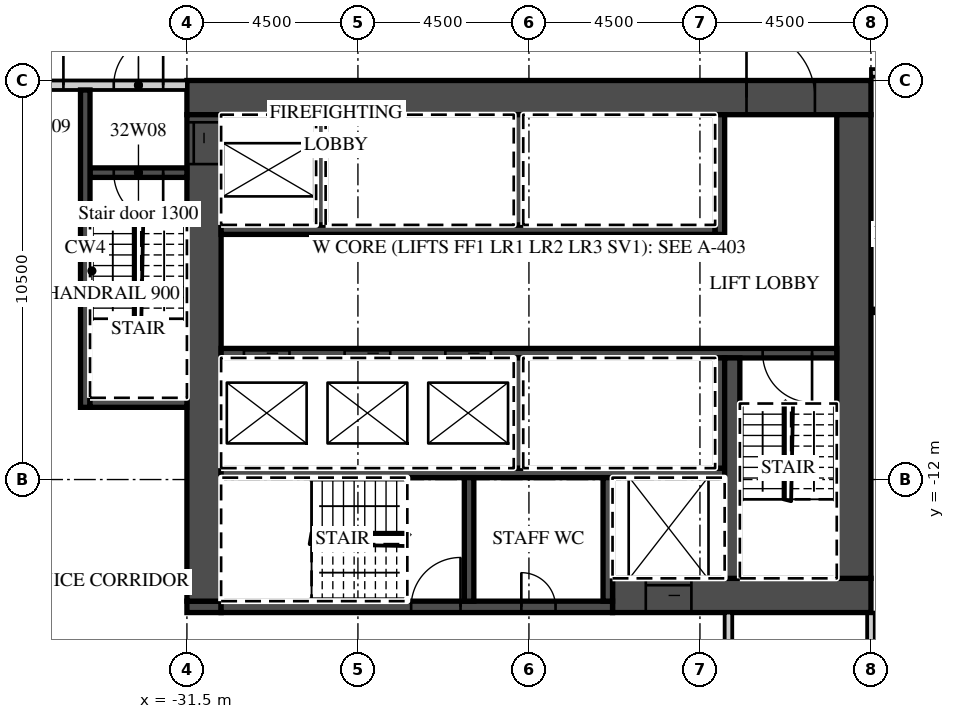
"""IFC4 building model, lengths in metres.
Left out: names, types, materials, properties, quantities, classifications, styles, units other than length and angle.
Written with IfcOpenShell. Run it as: python <this file> out.ifc"""

import sys

from ifc_helpers import new_model, si_unit, direction, frame, frame_2d, origin, place, context, subcontext, project, spatial, rectangle, extrude, element, fill, save


model = new_model("IFC4")
c1 = context("Model", 3, precision=1e-05, world=origin(), true_north=direction((0.0, 1.0)))
c2 = subcontext(c1, "Body", "Model", "MODEL_VIEW")
j1 = project(units=[si_unit("LENGTHUNIT", "METRE"), si_unit("PLANEANGLEUNIT", "RADIAN")], contexts=[c1])
p1 = place(None, origin())
s1 = spatial("IfcSite", under=j1, at=p1, CompositionType="ELEMENT")
p2 = place(p1, origin())
s2 = spatial("IfcBuilding", under=s1, at=p2, CompositionType="ELEMENT")
p3 = place(p2, frame((0.0, 0.0, 140.5)))
s3 = spatial("IfcBuildingStorey", under=s2, at=p3, CompositionType="ELEMENT", Elevation=140.5)
p4 = place(p3, frame((-13.5, -22.232, 0.0), z_axis=(0.0, 0.0, 1.0), x_axis=(0.0, 1.0, 0.0)))
e1 = element("IfcWall", 1, at=p4, inside=s3, PredefinedType="PARTITIONING", context=c2, shape_type="SweptSolid", body=[
    extrude(rectangle(XDim=6.732, YDim=0.2, at=frame_2d((3.366, 0.0))), origin(), (0.0, 0.0, 1.0), 3.02),
])
p5 = place(p3, frame((-13.5, -1.3, 0.0), z_axis=(0.0, 0.0, 1.0), x_axis=(1.0, 0.0, 0.0)))
e2 = element("IfcWall", 2, at=p5, inside=s3, PredefinedType="PARTITIONING", context=c2, shape_type="SweptSolid", body=[
    extrude(rectangle(XDim=60.932, YDim=0.2, at=frame_2d((30.466, 0.0))), origin(), (0.0, 0.0, 1.0), 3.02),
])
p6 = place(p5, frame((2.925, 0.0, 0.0)))
e3 = element("IfcOpeningElement", 3, at=p6, cuts=e2, PredefinedType="OPENING", context=c2, shape_type="SweptSolid", body=[
    extrude(rectangle(XDim=1.0, YDim=2.1, at=frame_2d((0.5, 1.05))), frame((0.0, 0.11, 0.0), z_axis=(0.0, -1.0, 0.0), x_axis=(1.0, 0.0, 0.0)), (0.0, 0.0, 1.0), 0.22),
])
p7 = place(p5, frame((7.45, 0.0, 0.0)))
e4 = element("IfcOpeningElement", 4, at=p7, cuts=e2, PredefinedType="OPENING", context=c2, shape_type="SweptSolid", body=[
    extrude(rectangle(XDim=1.0, YDim=2.1, at=frame_2d((0.5, 1.05))), frame((0.0, 0.11, 0.0), z_axis=(0.0, -1.0, 0.0), x_axis=(1.0, 0.0, 0.0)), (0.0, 0.0, 1.0), 0.22),
])
p8 = place(p5, frame((9.55, 0.0, 0.0)))
e5 = element("IfcOpeningElement", 5, at=p8, cuts=e2, PredefinedType="OPENING", context=c2, shape_type="SweptSolid", body=[
    extrude(rectangle(XDim=1.0, YDim=2.1, at=frame_2d((0.5, 1.05))), frame((0.0, 0.11, 0.0), z_axis=(0.0, -1.0, 0.0), x_axis=(1.0, 0.0, 0.0)), (0.0, 0.0, 1.0), 0.22),
])
p9 = place(p5, frame((15.938, 0.0, 0.0)))
e6 = element("IfcOpeningElement", 6, at=p9, cuts=e2, PredefinedType="OPENING", context=c2, shape_type="SweptSolid", body=[
    extrude(rectangle(XDim=1.2, YDim=2.1, at=frame_2d((0.6, 1.05))), frame((0.0, 0.11, 0.0), z_axis=(0.0, -1.0, 0.0), x_axis=(1.0, 0.0, 0.0)), (0.0, 0.0, 1.0), 0.22),
])
p10 = place(p5, frame((24.938, 0.0, 0.0)))
e7 = element("IfcOpeningElement", 7, at=p10, cuts=e2, PredefinedType="OPENING", context=c2, shape_type="SweptSolid", body=[
    extrude(rectangle(XDim=1.2, YDim=2.1, at=frame_2d((0.6, 1.05))), frame((0.0, 0.11, 0.0), z_axis=(0.0, -1.0, 0.0), x_axis=(1.0, 0.0, 0.0)), (0.0, 0.0, 1.0), 0.22),
])
p11 = place(p5, frame((32.075, 0.0, 0.0)))
e8 = element("IfcOpeningElement", 8, at=p11, cuts=e2, PredefinedType="OPENING", context=c2, shape_type="SweptSolid", body=[
    extrude(rectangle(XDim=1.0, YDim=2.1, at=frame_2d((0.5, 1.05))), frame((0.0, 0.11, 0.0), z_axis=(0.0, -1.0, 0.0), x_axis=(1.0, 0.0, 0.0)), (0.0, 0.0, 1.0), 0.22),
])
p12 = place(p5, frame((36.55, 0.0, 0.0)))
e9 = element("IfcOpeningElement", 9, at=p12, cuts=e2, PredefinedType="OPENING", context=c2, shape_type="SweptSolid", body=[
    extrude(rectangle(XDim=1.0, YDim=2.1, at=frame_2d((0.5, 1.05))), frame((0.0, 0.11, 0.0), z_axis=(0.0, -1.0, 0.0), x_axis=(1.0, 0.0, 0.0)), (0.0, 0.0, 1.0), 0.22),
])
p13 = place(p5, frame((45.862, 0.0, 0.0)))
e10 = element("IfcOpeningElement", 10, at=p13, cuts=e2, PredefinedType="OPENING", context=c2, shape_type="SweptSolid", body=[
    extrude(rectangle(XDim=1.2, YDim=2.1, at=frame_2d((0.6, 1.05))), frame((0.0, 0.11, 0.0), z_axis=(0.0, -1.0, 0.0), x_axis=(1.0, 0.0, 0.0)), (0.0, 0.0, 1.0), 0.22),
])
p14 = place(p5, frame((50.075, 0.0, 0.0)))
e11 = element("IfcOpeningElement", 11, at=p14, cuts=e2, PredefinedType="OPENING", context=c2, shape_type="SweptSolid", body=[
    extrude(rectangle(XDim=1.0, YDim=2.1, at=frame_2d((0.5, 1.05))), frame((0.0, 0.11, 0.0), z_axis=(0.0, -1.0, 0.0), x_axis=(1.0, 0.0, 0.0)), (0.0, 0.0, 1.0), 0.22),
])
p15 = place(p5, frame((56.95, 0.0, 0.0)))
e12 = element("IfcOpeningElement", 12, at=p15, cuts=e2, PredefinedType="OPENING", context=c2, shape_type="SweptSolid", body=[
    extrude(rectangle(XDim=1.0, YDim=2.1, at=frame_2d((0.5, 1.05))), frame((0.0, 0.11, 0.0), z_axis=(0.0, -1.0, 0.0), x_axis=(1.0, 0.0, 0.0)), (0.0, 0.0, 1.0), 0.22),
])
p16 = place(p5, frame((59.882, 0.0, 0.0)))
e13 = element("IfcOpeningElement", 13, at=p16, cuts=e2, PredefinedType="OPENING", context=c2, shape_type="SweptSolid", body=[
    extrude(rectangle(XDim=0.9, YDim=2.1, at=frame_2d((0.45, 1.05))), frame((0.0, 0.11, 0.0), z_axis=(0.0, -1.0, 0.0), x_axis=(1.0, 0.0, 0.0)), (0.0, 0.0, 1.0), 0.22),
])
p17 = place(p3, frame((-31.5, -1.95, 0.0), z_axis=(0.0, 0.0, 1.0), x_axis=(1.0, 0.0, 0.0)))
e14 = element("IfcWall", 14, at=p17, inside=s3, PredefinedType="SHEAR", context=c2, shape_type="SweptSolid", body=[
    extrude(rectangle(XDim=18.0, YDim=0.9, at=frame_2d((9.0, 0.0))), origin(), (0.0, 0.0, 1.0), 3.02),
])
p18 = place(p17, frame((14.725, 0.0, 0.0)))
e15 = element("IfcOpeningElement", 15, at=p18, cuts=e14, PredefinedType="OPENING", context=c2, shape_type="SweptSolid", body=[
    extrude(rectangle(XDim=1.8, YDim=2.1, at=frame_2d((0.9, 1.05))), frame((0.0, 0.46, 0.0), z_axis=(0.0, -1.0, 0.0), x_axis=(1.0, 0.0, 0.0)), (0.0, 0.0, 1.0), 0.92),
])
p19 = place(p3, frame((-20.3, -15.05, 0.0), z_axis=(0.0, 0.0, 1.0), x_axis=(1.0, 0.0, 0.0)))
e16 = element("IfcWall", 16, at=p19, inside=s3, PredefinedType="SHEAR", context=c2, shape_type="SweptSolid", body=[
    extrude(rectangle(XDim=6.8, YDim=0.9, at=frame_2d((3.4, 0.0))), origin(), (0.0, 0.0, 1.0), 3.02),
])
p20 = place(p19, frame((0.875, 0.0, 0.0)))
e17 = element("IfcOpeningElement", 17, at=p20, cuts=e16, PredefinedType="OPENING", context=c2, shape_type="SweptSolid", body=[
    extrude(rectangle(XDim=1.2, YDim=2.1, at=frame_2d((0.6, 1.05))), frame((0.0, 0.46, 0.0), z_axis=(0.0, -1.0, 0.0), x_axis=(1.0, 0.0, 0.0)), (0.0, 0.0, 1.0), 0.92),
])
p21 = place(p3, frame((-31.5, -15.35, 0.0), z_axis=(0.0, 0.0, 1.0), x_axis=(1.0, 0.0, 0.0)))
e18 = element("IfcWall", 18, at=p21, inside=s3, PredefinedType="SHEAR", context=c2, shape_type="SweptSolid", body=[
    extrude(rectangle(XDim=0.9, YDim=0.3, at=frame_2d((0.45, 0.0))), origin(), (0.0, 0.0, 1.0), 3.02),
])
p22 = place(p3, frame((-30.6, -15.35, 0.0), z_axis=(0.0, 0.0, 1.0), x_axis=(1.0, 0.0, 0.0)))
e19 = element("IfcWall", 19, at=p22, inside=s3, PredefinedType="SHEAR", context=c2, shape_type="SweptSolid", body=[
    extrude(rectangle(XDim=10.3, YDim=0.3, at=frame_2d((5.15, 0.0))), origin(), (0.0, 0.0, 1.0), 3.02),
])
p23 = place(p22, frame((5.0, 0.0, 0.0)))
e20 = element("IfcOpeningElement", 20, at=p23, cuts=e19, PredefinedType="OPENING", context=c2, shape_type="SweptSolid", body=[
    extrude(rectangle(XDim=1.3, YDim=2.1, at=frame_2d((0.65, 1.05))), frame((0.0, 0.16, 0.0), z_axis=(0.0, -1.0, 0.0), x_axis=(1.0, 0.0, 0.0)), (0.0, 0.0, 1.0), 0.32),
])
p24 = place(p22, frame((7.9, 0.0, 0.0)))
e21 = element("IfcOpeningElement", 21, at=p24, cuts=e19, PredefinedType="OPENING", context=c2, shape_type="SweptSolid", body=[
    extrude(rectangle(XDim=0.9, YDim=2.1, at=frame_2d((0.45, 1.05))), frame((0.0, 0.16, 0.0), z_axis=(0.0, -1.0, 0.0), x_axis=(1.0, 0.0, 0.0)), (0.0, 0.0, 1.0), 0.32),
])
p25 = place(p3, frame((-31.05, -15.2, 0.0), z_axis=(0.0, 0.0, 1.0), x_axis=(0.0, 1.0, 0.0)))
e22 = element("IfcWall", 22, at=p25, inside=s3, PredefinedType="SHEAR", context=c2, shape_type="SweptSolid", body=[
    extrude(rectangle(XDim=12.8, YDim=0.9, at=frame_2d((6.4, 0.0))), origin(), (0.0, 0.0, 1.0), 3.02),
])
p26 = place(p25, frame((11.5, 0.0, 0.0)))
e23 = element("IfcOpeningElement", 23, at=p26, cuts=e22, PredefinedType="OPENING", context=c2, shape_type="SweptSolid", body=[
    extrude(rectangle(XDim=1.1, YDim=2.1, at=frame_2d((0.55, 1.05))), frame((0.0, 0.46, 0.0), z_axis=(0.0, -1.0, 0.0), x_axis=(1.0, 0.0, 0.0)), (0.0, 0.0, 1.0), 0.92),
])
p27 = place(p3, frame((-13.95, -14.6, 0.0), z_axis=(0.0, 0.0, 1.0), x_axis=(0.0, 1.0, 0.0)))
e24 = element("IfcWall", 24, at=p27, inside=s3, PredefinedType="SHEAR", context=c2, shape_type="SweptSolid", body=[
    extrude(rectangle(XDim=12.2, YDim=0.9, at=frame_2d((6.1, 0.0))), origin(), (0.0, 0.0, 1.0), 3.02),
])
p28 = place(p3, frame((-30.6, -5.425, 0.0), z_axis=(0.0, 0.0, 1.0), x_axis=(1.0, 0.0, 0.0)))
e25 = element("IfcWall", 25, at=p28, inside=s3, PredefinedType="SHEAR", context=c2, shape_type="SweptSolid", body=[
    extrude(rectangle(XDim=13.0, YDim=0.25, at=frame_2d((6.5, 0.0))), origin(), (0.0, 0.0, 1.0), 3.02),
])
p29 = place(p3, frame((-17.475, -5.55, 0.0), z_axis=(0.0, 0.0, 1.0), x_axis=(0.0, 1.0, 0.0)))
e26 = element("IfcWall", 26, at=p29, inside=s3, PredefinedType="SHEAR", context=c2, shape_type="SweptSolid", body=[
    extrude(rectangle(XDim=3.15, YDim=0.25, at=frame_2d((1.575, 0.0))), origin(), (0.0, 0.0, 1.0), 3.02),
])
for number, where, z_axis, x_axis in (
    (27, (-27.975, -5.3, 0.0), (0.0, 0.0, 1.0), (0.0, 1.0, 0.0)),
    (28, (-22.775, -5.3, 0.0), (0.0, 0.0, 1.0), (0.0, 1.0, 0.0)),
):
    element("IfcWall", number, at=place(p3, frame(where, z_axis=z_axis, x_axis=x_axis)), inside=s3, PredefinedType="SHEAR", context=c2, shape_type="SweptSolid", body=[
        extrude(rectangle(XDim=2.9, YDim=0.25, at=frame_2d((1.45, 0.0))), origin(), (0.0, 0.0, 1.0), 3.02),
    ])
p30 = place(p3, frame((-30.6, -8.675, 0.0), z_axis=(0.0, 0.0, 1.0), x_axis=(1.0, 0.0, 0.0)))
e29 = element("IfcWall", 29, at=p30, inside=s3, PredefinedType="SHEAR", context=c2, shape_type="SweptSolid", body=[
    extrude(rectangle(XDim=16.2, YDim=0.25, at=frame_2d((8.1, 0.0))), origin(), (0.0, 0.0, 1.0), 3.02),
])
p31 = place(p30, frame((0.6, 0.0, 0.0)))
e30 = element("IfcOpeningElement", 30, at=p31, cuts=e29, PredefinedType="OPENING", context=c2, shape_type="SweptSolid", body=[
    extrude(rectangle(XDim=1.2, YDim=2.1, at=frame_2d((0.6, 1.05))), frame((0.0, 0.135, 0.0), z_axis=(0.0, -1.0, 0.0), x_axis=(1.0, 0.0, 0.0)), (0.0, 0.0, 1.0), 0.27),
])
p32 = place(p30, frame((3.25, 0.0, 0.0)))
e31 = element("IfcOpeningElement", 31, at=p32, cuts=e29, PredefinedType="OPENING", context=c2, shape_type="SweptSolid", body=[
    extrude(rectangle(XDim=1.2, YDim=2.1, at=frame_2d((0.6, 1.05))), frame((0.0, 0.135, 0.0), z_axis=(0.0, -1.0, 0.0), x_axis=(1.0, 0.0, 0.0)), (0.0, 0.0, 1.0), 0.27),
])
p33 = place(p30, frame((5.9, 0.0, 0.0)))
e32 = element("IfcOpeningElement", 32, at=p33, cuts=e29, PredefinedType="OPENING", context=c2, shape_type="SweptSolid", body=[
    extrude(rectangle(XDim=1.2, YDim=2.1, at=frame_2d((0.6, 1.05))), frame((0.0, 0.135, 0.0), z_axis=(0.0, -1.0, 0.0), x_axis=(1.0, 0.0, 0.0)), (0.0, 0.0, 1.0), 0.27),
])
p34 = place(p30, frame((14.25, 0.0, 0.0)))
e33 = element("IfcOpeningElement", 33, at=p34, cuts=e29, PredefinedType="OPENING", context=c2, shape_type="SweptSolid", body=[
    extrude(rectangle(XDim=1.3, YDim=2.1, at=frame_2d((0.65, 1.05))), frame((0.0, 0.135, 0.0), z_axis=(0.0, -1.0, 0.0), x_axis=(1.0, 0.0, 0.0)), (0.0, 0.0, 1.0), 0.27),
])
p35 = place(p3, frame((-30.6, -11.825, 0.0), z_axis=(0.0, 0.0, 1.0), x_axis=(1.0, 0.0, 0.0)))
e34 = element("IfcWall", 34, at=p35, inside=s3, PredefinedType="SHEAR", context=c2, shape_type="SweptSolid", body=[
    extrude(rectangle(XDim=13.25, YDim=0.25, at=frame_2d((6.625, 0.0))), origin(), (0.0, 0.0, 1.0), 3.02),
])
for number, where, z_axis, x_axis in (
    (35, (-17.475, -11.7, 0.0), (0.0, 0.0, 1.0), (0.0, 1.0, 0.0)),
    (36, (-22.775, -11.7, 0.0), (0.0, 0.0, 1.0), (0.0, 1.0, 0.0)),
):
    element("IfcWall", number, at=place(p3, frame(where, z_axis=z_axis, x_axis=x_axis)), inside=s3, PredefinedType="SHEAR", context=c2, shape_type="SweptSolid", body=[
        extrude(rectangle(XDim=2.9, YDim=0.25, at=frame_2d((1.45, 0.0))), origin(), (0.0, 0.0, 1.0), 3.02),
    ])
p36 = place(p3, frame((-17.15, -14.6, 0.0), z_axis=(0.0, 0.0, 1.0), x_axis=(0.0, 1.0, 0.0)))
e37 = element("IfcWall", 37, at=p36, inside=s3, PredefinedType="SHEAR", context=c2, shape_type="SweptSolid", body=[
    extrude(rectangle(XDim=5.8, YDim=0.4, at=frame_2d((2.9, 0.0))), origin(), (0.0, 0.0, 1.0), 3.02),
])
for number, where, z_axis, x_axis in (
    (38, (-20.425, -15.2, 0.0), (0.0, 0.0, 1.0), (0.0, 1.0, 0.0)),
    (39, (-24.075, -15.2, 0.0), (0.0, 0.0, 1.0), (0.0, 1.0, 0.0)),
):
    element("IfcWall", number, at=place(p3, frame(where, z_axis=z_axis, x_axis=x_axis)), inside=s3, PredefinedType="SHEAR", context=c2, shape_type="SweptSolid", body=[
        extrude(rectangle(XDim=3.25, YDim=0.25, at=frame_2d((1.625, 0.0))), origin(), (0.0, 0.0, 1.0), 3.02),
    ])
p37 = place(p3, frame((-39.035, -1.625, 0.0), z_axis=(0.0, 0.0, 1.0), x_axis=(1.0, 0.0, 0.0)))
e40 = element("IfcWall", 40, at=p37, inside=s3, PredefinedType="PARTITIONING", context=c2, shape_type="SweptSolid", body=[
    extrude(rectangle(XDim=7.535, YDim=0.25, at=frame_2d((3.768, 0.0))), origin(), (0.0, 0.0, 1.0), 3.02),
])
p38 = place(p37, frame((5.61, 0.0, 0.0)))
e41 = element("IfcOpeningElement", 41, at=p38, cuts=e40, PredefinedType="OPENING", context=c2, shape_type="SweptSolid", body=[
    extrude(rectangle(XDim=1.3, YDim=2.1, at=frame_2d((0.65, 1.05))), frame((0.0, 0.135, 0.0), z_axis=(0.0, -1.0, 0.0), x_axis=(1.0, 0.0, 0.0)), (0.0, 0.0, 1.0), 0.27),
])
p39 = place(p37, frame((3.185, 0.0, 0.0)))
e42 = element("IfcOpeningElement", 42, at=p39, cuts=e40, PredefinedType="OPENING", context=c2, shape_type="SweptSolid", body=[
    extrude(rectangle(XDim=1.1, YDim=2.1, at=frame_2d((0.55, 1.05))), frame((0.0, 0.135, 0.0), z_axis=(0.0, -1.0, 0.0), x_axis=(1.0, 0.0, 0.0)), (0.0, 0.0, 1.0), 0.27),
])
p40 = place(p3, frame((-34.05, -3.925, 0.0), z_axis=(0.0, 0.0, 1.0), x_axis=(1.0, 0.0, 0.0)))
e43 = element("IfcWall", 43, at=p40, inside=s3, PredefinedType="SHEAR", context=c2, shape_type="SweptSolid", body=[
    extrude(rectangle(XDim=2.55, YDim=0.25, at=frame_2d((1.275, 0.0))), origin(), (0.0, 0.0, 1.0), 3.02),
])
p41 = place(p40, frame((0.625, 0.0, 0.0)))
e44 = element("IfcOpeningElement", 44, at=p41, cuts=e43, PredefinedType="OPENING", context=c2, shape_type="SweptSolid", body=[
    extrude(rectangle(XDim=1.3, YDim=2.1, at=frame_2d((0.65, 1.05))), frame((0.0, 0.135, 0.0), z_axis=(0.0, -1.0, 0.0), x_axis=(1.0, 0.0, 0.0)), (0.0, 0.0, 1.0), 0.27),
])
p42 = place(p3, frame((-34.175, -10.1, 0.0), z_axis=(0.0, 0.0, 1.0), x_axis=(0.0, 1.0, 0.0)))
e45 = element("IfcWall", 45, at=p42, inside=s3, PredefinedType="SHEAR", context=c2, shape_type="SweptSolid", body=[
    extrude(rectangle(XDim=8.35, YDim=0.25, at=frame_2d((4.175, 0.0))), origin(), (0.0, 0.0, 1.0), 3.02),
])
p43 = place(p3, frame((-34.05, -9.975, 0.0), z_axis=(0.0, 0.0, 1.0), x_axis=(1.0, 0.0, 0.0)))
e46 = element("IfcWall", 46, at=p43, inside=s3, PredefinedType="SHEAR", context=c2, shape_type="SweptSolid", body=[
    extrude(rectangle(XDim=2.55, YDim=0.25, at=frame_2d((1.275, 0.0))), origin(), (0.0, 0.0, 1.0), 3.02),
])
p44 = place(p3, frame((-17.25, -17.7, 0.0), z_axis=(0.0, 0.0, 1.0), x_axis=(0.0, 1.0, 0.0)))
e47 = element("IfcWall", 47, at=p44, inside=s3, PredefinedType="PARTITIONING", context=c2, shape_type="SweptSolid", body=[
    extrude(rectangle(XDim=2.2, YDim=0.2, at=frame_2d((1.1, 0.0))), origin(), (0.0, 0.0, 1.0), 3.02),
])
p45 = place(p31, origin())
e48 = element("IfcDoor", 48, at=p45, inside=s3, OperationType="SLIDING_TO_LEFT", PredefinedType="DOOR", context=c2, shape_type="SweptSolid", body=[
    extrude(rectangle(XDim=1.2, YDim=2.1, at=frame_2d((0.6, 1.05))), frame((0.0, 0.025, 0.0), z_axis=(0.0, -1.0, 0.0), x_axis=(1.0, 0.0, 0.0)), (0.0, 0.0, 1.0), 0.05),
])
fill(e30, e48)
p46 = place(p32, origin())
e49 = element("IfcDoor", 49, at=p46, inside=s3, OperationType="SLIDING_TO_RIGHT", PredefinedType="DOOR", context=c2, shape_type="SweptSolid", body=[
    extrude(rectangle(XDim=1.2, YDim=2.1, at=frame_2d((0.6, 1.05))), frame((0.0, 0.025, 0.0), z_axis=(0.0, -1.0, 0.0), x_axis=(1.0, 0.0, 0.0)), (0.0, 0.0, 1.0), 0.05),
])
fill(e31, e49)
p47 = place(p33, origin())
e50 = element("IfcDoor", 50, at=p47, inside=s3, OperationType="SLIDING_TO_RIGHT", PredefinedType="DOOR", context=c2, shape_type="SweptSolid", body=[
    extrude(rectangle(XDim=1.2, YDim=2.1, at=frame_2d((0.6, 1.05))), frame((0.0, 0.025, 0.0), z_axis=(0.0, -1.0, 0.0), x_axis=(1.0, 0.0, 0.0)), (0.0, 0.0, 1.0), 0.05),
])
fill(e32, e50)
p48 = place(p20, origin())
e51 = element("IfcDoor", 51, at=p48, inside=s3, OperationType="SLIDING_TO_LEFT", PredefinedType="DOOR", context=c2, shape_type="SweptSolid", body=[
    extrude(rectangle(XDim=1.2, YDim=2.1, at=frame_2d((0.6, 1.05))), frame((0.0, 0.025, 0.0), z_axis=(0.0, -1.0, 0.0), x_axis=(1.0, 0.0, 0.0)), (0.0, 0.0, 1.0), 0.05),
])
fill(e17, e51)
p49 = place(p26, origin())
e52 = element("IfcDoor", 52, at=p49, inside=s3, OperationType="SLIDING_TO_RIGHT", PredefinedType="DOOR", context=c2, shape_type="SweptSolid", body=[
    extrude(rectangle(XDim=1.1, YDim=2.1, at=frame_2d((0.55, 1.05))), frame((0.0, 0.025, 0.0), z_axis=(0.0, -1.0, 0.0), x_axis=(1.0, 0.0, 0.0)), (0.0, 0.0, 1.0), 0.05),
])
fill(e23, e52)
p50 = place(p18, origin())
e53 = element("IfcDoor", 53, at=p50, inside=s3, OperationType="DOUBLE_DOOR_DOUBLE_SWING", PredefinedType="DOOR", context=c2, shape_type="SweptSolid", body=[
    extrude(rectangle(XDim=1.8, YDim=2.1, at=frame_2d((0.9, 1.05))), frame((0.0, 0.025, 0.0), z_axis=(0.0, -1.0, 0.0), x_axis=(1.0, 0.0, 0.0)), (0.0, 0.0, 1.0), 0.05),
])
fill(e15, e53)
p51 = place(p38, origin())
e54 = element("IfcDoor", 54, at=p51, inside=s3, OperationType="SINGLE_SWING_RIGHT", PredefinedType="DOOR", context=c2, shape_type="SweptSolid", body=[
    extrude(rectangle(XDim=1.3, YDim=2.1, at=frame_2d((0.65, 1.05))), frame((0.0, 0.025, 0.0), z_axis=(0.0, -1.0, 0.0), x_axis=(1.0, 0.0, 0.0)), (0.0, 0.0, 1.0), 0.05),
])
fill(e41, e54)
p52 = place(p41, origin())
e55 = element("IfcDoor", 55, at=p52, inside=s3, OperationType="SINGLE_SWING_RIGHT", PredefinedType="DOOR", context=c2, shape_type="SweptSolid", body=[
    extrude(rectangle(XDim=1.3, YDim=2.1, at=frame_2d((0.65, 1.05))), frame((0.0, 0.025, 0.0), z_axis=(0.0, -1.0, 0.0), x_axis=(1.0, 0.0, 0.0)), (0.0, 0.0, 1.0), 0.05),
])
fill(e44, e55)
p53 = place(p39, origin())
e56 = element("IfcDoor", 56, at=p53, inside=s3, OperationType="SINGLE_SWING_RIGHT", PredefinedType="DOOR", context=c2, shape_type="SweptSolid", body=[
    extrude(rectangle(XDim=1.1, YDim=2.1, at=frame_2d((0.55, 1.05))), frame((0.0, 0.025, 0.0), z_axis=(0.0, -1.0, 0.0), x_axis=(1.0, 0.0, 0.0)), (0.0, 0.0, 1.0), 0.05),
])
fill(e42, e56)
p54 = place(p34, origin())
e57 = element("IfcDoor", 57, at=p54, inside=s3, OperationType="SINGLE_SWING_RIGHT", PredefinedType="DOOR", context=c2, shape_type="SweptSolid", body=[
    extrude(rectangle(XDim=1.3, YDim=2.1, at=frame_2d((0.65, 1.05))), frame((0.0, 0.025, 0.0), z_axis=(0.0, -1.0, 0.0), x_axis=(1.0, 0.0, 0.0)), (0.0, 0.0, 1.0), 0.05),
])
fill(e33, e57)
p55 = place(p23, origin())
e58 = element("IfcDoor", 58, at=p55, inside=s3, OperationType="SINGLE_SWING_RIGHT", PredefinedType="DOOR", context=c2, shape_type="SweptSolid", body=[
    extrude(rectangle(XDim=1.3, YDim=2.1, at=frame_2d((0.65, 1.05))), frame((0.0, 0.025, 0.0), z_axis=(0.0, -1.0, 0.0), x_axis=(1.0, 0.0, 0.0)), (0.0, 0.0, 1.0), 0.05),
])
fill(e20, e58)
p56 = place(p24, origin())
e59 = element("IfcDoor", 59, at=p56, inside=s3, OperationType="SINGLE_SWING_LEFT", PredefinedType="DOOR", context=c2, shape_type="SweptSolid", body=[
    extrude(rectangle(XDim=0.9, YDim=2.1, at=frame_2d((0.45, 1.05))), frame((0.0, 0.025, 0.0), z_axis=(0.0, -1.0, 0.0), x_axis=(1.0, 0.0, 0.0)), (0.0, 0.0, 1.0), 0.05),
])
fill(e21, e59)
save(model, sys.argv[1])
